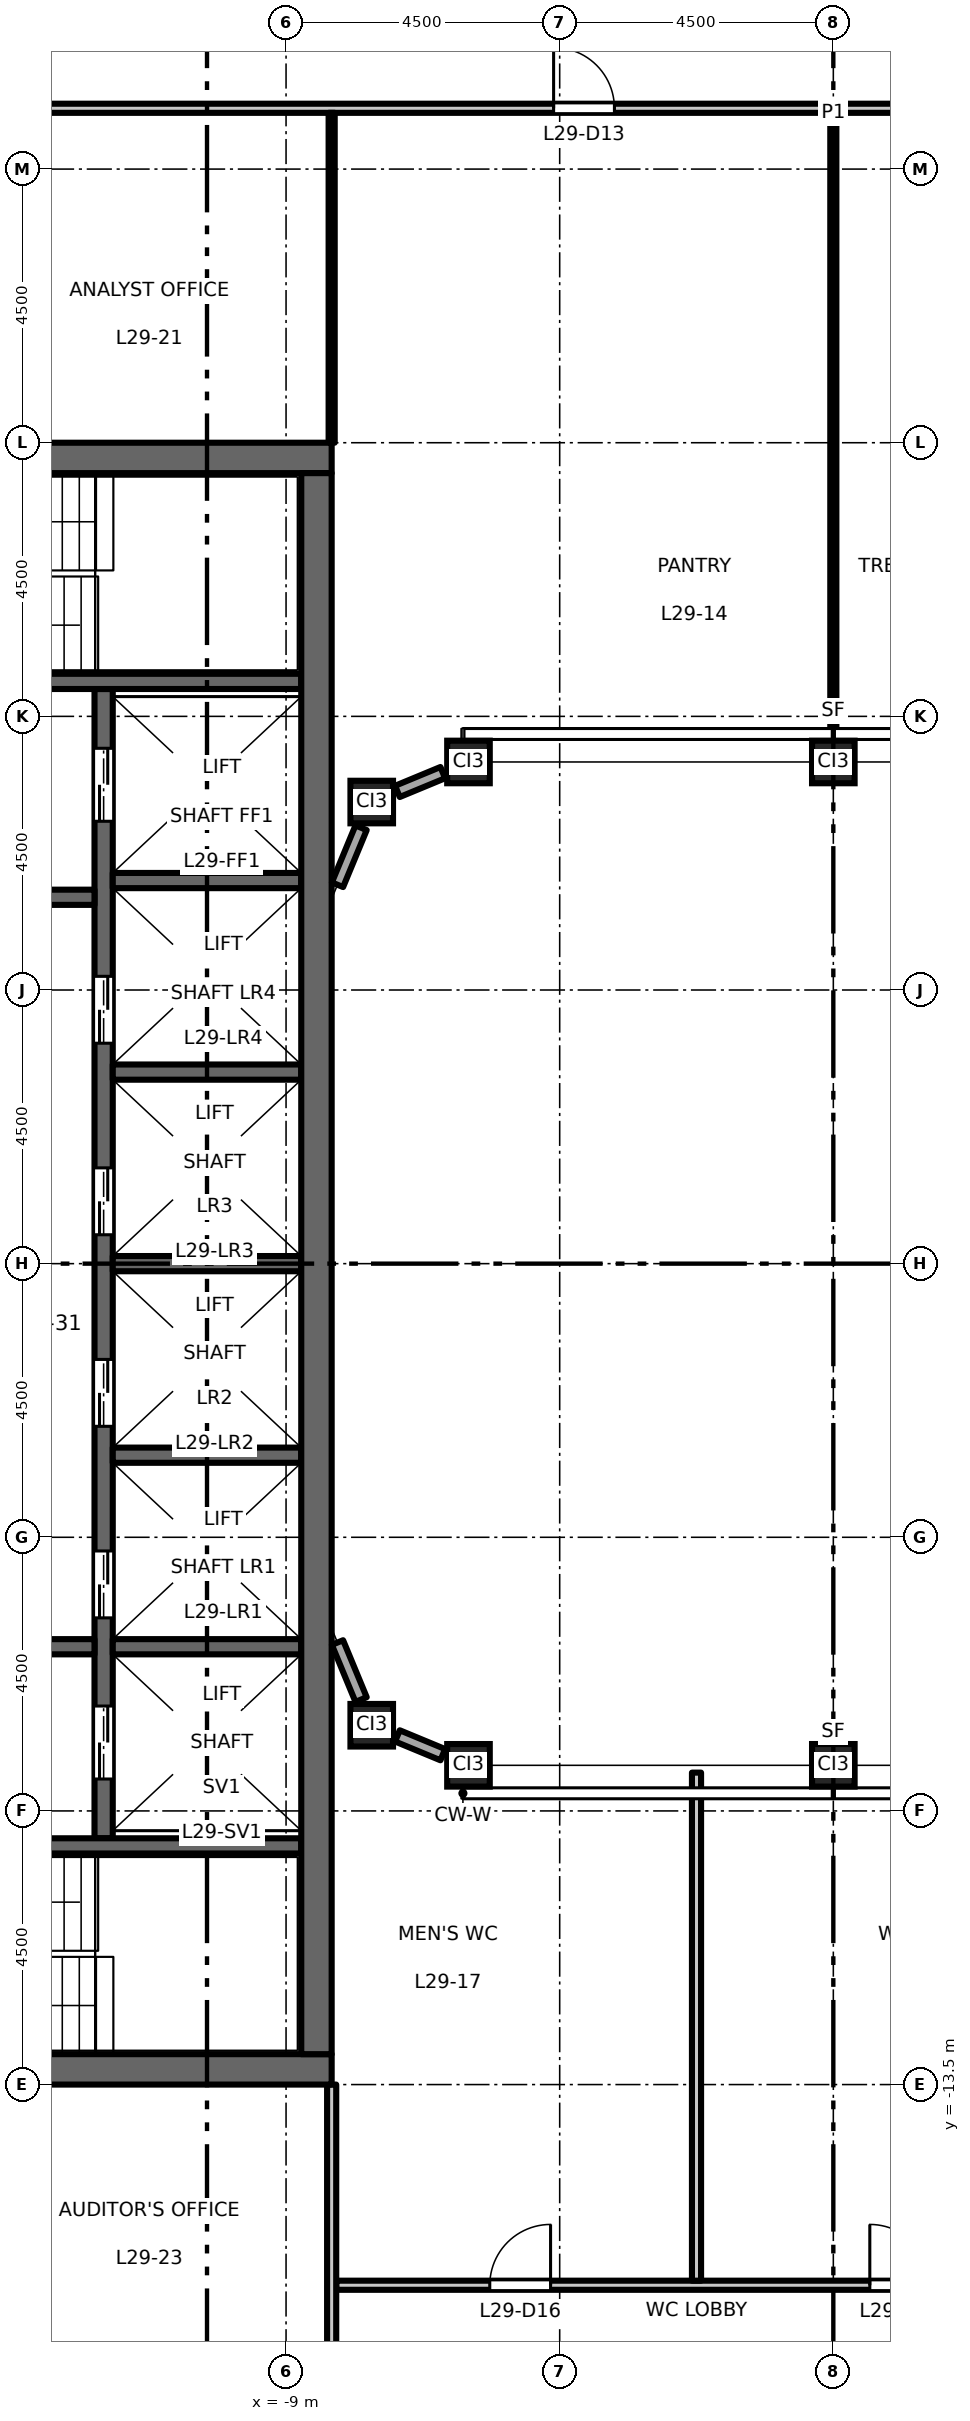
"""IFC4 building model, lengths in metres.
Left out: names, types, materials, properties, quantities, classifications, styles, units other than length and angle.
Written with IfcOpenShell. Run it as: python <this file> out.ifc"""

import sys

from ifc_helpers import new_model, si_unit, direction, frame, frame_2d, origin, origin_2d, place, context, subcontext, project, spatial, rectangle, hollow_rectangle, extrude, element, fill, save


model = new_model("IFC4")
c1 = context("Model", 3, precision=1e-05, world=origin(), true_north=direction((0.0, 1.0)))
c2 = subcontext(c1, "Body", "Model", "MODEL_VIEW")
j1 = project(units=[si_unit("LENGTHUNIT", "METRE"), si_unit("PLANEANGLEUNIT", "RADIAN")], contexts=[c1])
p1 = place(None, origin())
s1 = spatial("IfcSite", under=j1, at=p1, CompositionType="ELEMENT")
p2 = place(p1, origin())
s2 = spatial("IfcBuilding", under=s1, at=p2, CompositionType="ELEMENT")
p3 = place(p2, frame((0.0, 0.0, 136.2)))
s3 = spatial("IfcBuildingStorey", under=s2, at=p3, CompositionType="ELEMENT", Elevation=136.2)
for number, where, z_axis, x_axis in (
    (1, (-7.591, -7.591, 0.0), (0.0, 0.0, 1.0), (1.0, 0.0, 0.0)),
    (2, (-6.0, -8.25, 0.0), (0.0, 0.0, 1.0), (1.0, 0.0, 0.0)),
    (3, (0.0, -8.25, 0.0), (0.0, 0.0, 1.0), (1.0, 0.0, 0.0)),
    (4, (-7.591, 7.591, 0.0), (0.0, 0.0, 1.0), (1.0, 0.0, 0.0)),
    (5, (-6.0, 8.25, 0.0), (0.0, 0.0, 1.0), (1.0, 0.0, 0.0)),
    (6, (0.0, 8.25, 0.0), (0.0, 0.0, 1.0), (1.0, 0.0, 0.0)),
):
    element("IfcColumn", number, at=place(p3, frame(where, z_axis=z_axis, x_axis=x_axis)), inside=s3, PredefinedType="COLUMN", context=c2, shape_type="SweptSolid", body=[
        extrude(hollow_rectangle(XDim=0.7, YDim=0.7, WallThickness=0.04, at=origin_2d()), origin(), (0.0, 0.0, 1.0), 4.5),
    ])
p4 = place(p3, frame((-12.0, -9.45, 0.0), z_axis=(0.0, 0.0, 1.0), x_axis=(0.0, 1.0, 0.0)))
e7 = element("IfcWall", 7, at=p4, inside=s3, PredefinedType="SHEAR", context=c2, shape_type="SweptSolid", body=[
    extrude(rectangle(XDim=18.9, YDim=0.3, at=frame_2d((9.45, 0.0))), origin(), (0.0, 0.0, 1.0), 4.35),
])
p5 = place(p4, frame((3.625, 0.0, 0.0)))
e8 = element("IfcOpeningElement", 8, at=p5, cuts=e7, PredefinedType="OPENING", context=c2, shape_type="SweptSolid", body=[
    extrude(rectangle(XDim=1.1, YDim=2.1, at=frame_2d((0.55, 1.05))), frame((0.0, 0.16, 0.0), z_axis=(0.0, -1.0, 0.0), x_axis=(1.0, 0.0, 0.0)), (0.0, 0.0, 1.0), 0.32),
])
p6 = place(p4, frame((6.775, 0.0, 0.0)))
e9 = element("IfcOpeningElement", 9, at=p6, cuts=e7, PredefinedType="OPENING", context=c2, shape_type="SweptSolid", body=[
    extrude(rectangle(XDim=1.1, YDim=2.1, at=frame_2d((0.55, 1.05))), frame((0.0, 0.16, 0.0), z_axis=(0.0, -1.0, 0.0), x_axis=(1.0, 0.0, 0.0)), (0.0, 0.0, 1.0), 0.32),
])
p7 = place(p4, frame((9.925, 0.0, 0.0)))
e10 = element("IfcOpeningElement", 10, at=p7, cuts=e7, PredefinedType="OPENING", context=c2, shape_type="SweptSolid", body=[
    extrude(rectangle(XDim=1.1, YDim=2.1, at=frame_2d((0.55, 1.05))), frame((0.0, 0.16, 0.0), z_axis=(0.0, -1.0, 0.0), x_axis=(1.0, 0.0, 0.0)), (0.0, 0.0, 1.0), 0.32),
])
p8 = place(p4, frame((13.075, 0.0, 0.0)))
e11 = element("IfcOpeningElement", 11, at=p8, cuts=e7, PredefinedType="OPENING", context=c2, shape_type="SweptSolid", body=[
    extrude(rectangle(XDim=1.1, YDim=2.1, at=frame_2d((0.55, 1.05))), frame((0.0, 0.16, 0.0), z_axis=(0.0, -1.0, 0.0), x_axis=(1.0, 0.0, 0.0)), (0.0, 0.0, 1.0), 0.32),
])
p9 = place(p4, frame((16.725, 0.0, 0.0)))
e12 = element("IfcOpeningElement", 12, at=p9, cuts=e7, PredefinedType="OPENING", context=c2, shape_type="SweptSolid", body=[
    extrude(rectangle(XDim=1.2, YDim=2.1, at=frame_2d((0.6, 1.05))), frame((0.0, 0.16, 0.0), z_axis=(0.0, -1.0, 0.0), x_axis=(1.0, 0.0, 0.0)), (0.0, 0.0, 1.0), 0.32),
])
p10 = place(p4, frame((0.975, 0.0, 0.0)))
e13 = element("IfcOpeningElement", 13, at=p10, cuts=e7, PredefinedType="OPENING", context=c2, shape_type="SweptSolid", body=[
    extrude(rectangle(XDim=1.2, YDim=2.1, at=frame_2d((0.6, 1.05))), frame((0.0, 0.16, 0.0), z_axis=(0.0, -1.0, 0.0), x_axis=(1.0, 0.0, 0.0)), (0.0, 0.0, 1.0), 0.32),
])
p11 = place(p3, frame((-12.15, 6.025, 0.0), z_axis=(0.0, 0.0, 1.0), x_axis=(-1.0, 0.0, 0.0)))
e14 = element("IfcWall", 14, at=p11, inside=s3, PredefinedType="SHEAR", context=c2, shape_type="SweptSolid", body=[
    extrude(rectangle(XDim=4.6, YDim=0.25, at=frame_2d((2.3, 0.0))), origin(), (0.0, 0.0, 1.0), 4.35),
])
p12 = place(p11, frame((1.8, 0.0, 0.0)))
e15 = element("IfcOpeningElement", 15, at=p12, cuts=e14, PredefinedType="OPENING", context=c2, shape_type="SweptSolid", body=[
    extrude(rectangle(XDim=1.0, YDim=2.1, at=frame_2d((0.5, 1.05))), frame((0.0, 0.135, 0.0), z_axis=(0.0, -1.0, 0.0), x_axis=(1.0, 0.0, 0.0)), (0.0, 0.0, 1.0), 0.27),
])
p13 = place(p3, frame((-12.15, -6.3, 0.0), z_axis=(0.0, 0.0, 1.0), x_axis=(-1.0, 0.0, 0.0)))
e16 = element("IfcWall", 16, at=p13, inside=s3, PredefinedType="SHEAR", context=c2, shape_type="SweptSolid", body=[
    extrude(rectangle(XDim=9.1, YDim=0.25, at=frame_2d((4.55, 0.0))), origin(), (0.0, 0.0, 1.0), 4.35),
])
p14 = place(p13, frame((1.8, 0.0, 0.0)))
e17 = element("IfcOpeningElement", 17, at=p14, cuts=e16, PredefinedType="OPENING", context=c2, shape_type="SweptSolid", body=[
    extrude(rectangle(XDim=1.0, YDim=2.1, at=frame_2d((0.5, 1.05))), frame((0.0, 0.135, 0.0), z_axis=(0.0, -1.0, 0.0), x_axis=(1.0, 0.0, 0.0)), (0.0, 0.0, 1.0), 0.27),
])
p15 = place(p13, frame((6.65, 0.0, 0.0)))
e18 = element("IfcOpeningElement", 18, at=p15, cuts=e16, PredefinedType="OPENING", context=c2, shape_type="SweptSolid", body=[
    extrude(rectangle(XDim=0.9, YDim=2.1, at=frame_2d((0.45, 1.05))), frame((0.0, 0.135, 0.0), z_axis=(0.0, -1.0, 0.0), x_axis=(1.0, 0.0, 0.0)), (0.0, 0.0, 1.0), 0.27),
])
for number, where, z_axis, x_axis in (
    (19, (-8.75, 0.0, 0.0), (0.0, 0.0, 1.0), (-1.0, 0.0, 0.0)),
    (20, (-8.75, 3.15, 0.0), (0.0, 0.0, 1.0), (-1.0, 0.0, 0.0)),
    (21, (-8.75, 6.3, 0.0), (0.0, 0.0, 1.0), (-1.0, 0.0, 0.0)),
    (22, (-8.75, -3.15, 0.0), (0.0, 0.0, 1.0), (-1.0, 0.0, 0.0)),
    (23, (-8.75, -6.3, 0.0), (0.0, 0.0, 1.0), (-1.0, 0.0, 0.0)),
):
    element("IfcWall", number, at=place(p3, frame(where, z_axis=z_axis, x_axis=x_axis)), inside=s3, PredefinedType="SHEAR", context=c2, shape_type="SweptSolid", body=[
        extrude(rectangle(XDim=3.1, YDim=0.25, at=frame_2d((1.55, 0.0))), origin(), (0.0, 0.0, 1.0), 4.35),
    ])
p16 = place(p3, frame((-8.75, 9.575, 0.0), z_axis=(0.0, 0.0, 1.0), x_axis=(-1.0, 0.0, 0.0)))
e24 = element("IfcWall", 24, at=p16, inside=s3, PredefinedType="SHEAR", context=c2, shape_type="SweptSolid", body=[
    extrude(rectangle(XDim=8.0, YDim=0.25, at=frame_2d((4.0, 0.0))), origin(), (0.0, 0.0, 1.0), 4.35),
])
p17 = place(p16, frame((6.65, 0.0, 0.0)))
e25 = element("IfcOpeningElement", 25, at=p17, cuts=e24, PredefinedType="OPENING", context=c2, shape_type="SweptSolid", body=[
    extrude(rectangle(XDim=1.1, YDim=2.1, at=frame_2d((0.55, 1.05))), frame((0.0, 0.135, 0.0), z_axis=(0.0, -1.0, 0.0), x_axis=(1.0, 0.0, 0.0)), (0.0, 0.0, 1.0), 0.27),
])
p18 = place(p3, frame((-8.75, -9.575, 0.0), z_axis=(0.0, 0.0, 1.0), x_axis=(-1.0, 0.0, 0.0)))
e26 = element("IfcWall", 26, at=p18, inside=s3, PredefinedType="SHEAR", context=c2, shape_type="SweptSolid", body=[
    extrude(rectangle(XDim=8.0, YDim=0.25, at=frame_2d((4.0, 0.0))), origin(), (0.0, 0.0, 1.0), 4.35),
])
p19 = place(p18, frame((6.65, 0.0, 0.0)))
e27 = element("IfcOpeningElement", 27, at=p19, cuts=e26, PredefinedType="OPENING", context=c2, shape_type="SweptSolid", body=[
    extrude(rectangle(XDim=1.1, YDim=2.1, at=frame_2d((0.55, 1.05))), frame((0.0, 0.135, 0.0), z_axis=(0.0, -1.0, 0.0), x_axis=(1.0, 0.0, 0.0)), (0.0, 0.0, 1.0), 0.27),
])
for number, where, z_axis, x_axis in (
    (28, (-8.25, 13.25, 0.0), (0.0, 0.0, 1.0), (-1.0, 0.0, 0.0)),
    (29, (-8.25, -13.25, 0.0), (0.0, 0.0, 1.0), (-1.0, 0.0, 0.0)),
):
    element("IfcWall", number, at=place(p3, frame(where, z_axis=z_axis, x_axis=x_axis)), inside=s3, PredefinedType="SHEAR", context=c2, shape_type="SweptSolid", body=[
        extrude(rectangle(XDim=13.5, YDim=0.5, at=frame_2d((6.75, 0.0))), origin(), (0.0, 0.0, 1.0), 4.35),
    ])
p20 = place(p3, frame((-8.5, -13.0, 0.0), z_axis=(0.0, 0.0, 1.0), x_axis=(0.0, 1.0, 0.0)))
e30 = element("IfcWall", 30, at=p20, inside=s3, PredefinedType="SHEAR", context=c2, shape_type="SweptSolid", body=[
    extrude(rectangle(XDim=26.0, YDim=0.5, at=frame_2d((13.0, 0.0))), origin(), (0.0, 0.0, 1.0), 4.35),
])
p21 = place(p3, frame((-6.423, 8.075, 0.0), z_axis=(0.0, 0.0, 1.0), x_axis=(-0.923817771127, -0.382832503518, 0.0)))
e31 = element("IfcWall", 31, at=p21, inside=s3, PredefinedType="STANDARD", context=c2, shape_type="SweptSolid", body=[
    extrude(rectangle(XDim=0.807, YDim=0.2, at=frame_2d((0.404, 0.0))), origin(), (0.0, 0.0, 1.0), 3.826),
])
for number, where, z_axis, x_axis in (
    (32, (-7.766, 7.168, 0.0), (0.0, 0.0, 1.0), (-0.383, -0.924, 0.0)),
    (33, (-8.154, -6.231, 0.0), (0.0, 0.0, 1.0), (0.383, -0.924, 0.0)),
):
    element("IfcWall", number, at=place(p3, frame(where, z_axis=z_axis, x_axis=x_axis)), inside=s3, PredefinedType="STANDARD", context=c2, shape_type="SweptSolid", body=[
        extrude(rectangle(XDim=1.015, YDim=0.2, at=frame_2d((0.507, 0.0))), origin(), (0.0, 0.0, 1.0), 3.826),
    ])
p22 = place(p3, frame((-7.168, -7.766, 0.0), z_axis=(0.0, 0.0, 1.0), x_axis=(0.923817771127, -0.382832503518, 0.0)))
e34 = element("IfcWall", 34, at=p22, inside=s3, PredefinedType="STANDARD", context=c2, shape_type="SweptSolid", body=[
    extrude(rectangle(XDim=0.807, YDim=0.2, at=frame_2d((0.404, 0.0))), origin(), (0.0, 0.0, 1.0), 3.826),
])
p23 = place(p3, frame((-8.175, -16.8, 0.0), z_axis=(0.0, 0.0, 1.0), x_axis=(1.0, 0.0, 0.0)))
e35 = element("IfcWall", 35, at=p23, inside=s3, PredefinedType="PARTITIONING", context=c2, shape_type="SweptSolid", body=[
    extrude(rectangle(XDim=14.835, YDim=0.15, at=frame_2d((7.417, 0.0))), origin(), (0.0, 0.0, 1.0), 4.35),
])
p24 = place(p23, frame((2.525, 0.0, 0.0)))
e36 = element("IfcOpeningElement", 36, at=p24, cuts=e35, PredefinedType="OPENING", context=c2, shape_type="SweptSolid", body=[
    extrude(rectangle(XDim=1.0, YDim=2.1, at=frame_2d((0.5, 1.05))), frame((0.0, 0.085, 0.0), z_axis=(0.0, -1.0, 0.0), x_axis=(1.0, 0.0, 0.0)), (0.0, 0.0, 1.0), 0.17),
])
p25 = place(p23, frame((8.775, 0.0, 0.0)))
e37 = element("IfcOpeningElement", 37, at=p25, cuts=e35, PredefinedType="OPENING", context=c2, shape_type="SweptSolid", body=[
    extrude(rectangle(XDim=1.0, YDim=2.1, at=frame_2d((0.5, 1.05))), frame((0.0, 0.085, 0.0), z_axis=(0.0, -1.0, 0.0), x_axis=(1.0, 0.0, 0.0)), (0.0, 0.0, 1.0), 0.17),
])
p26 = place(p23, frame((12.935, 0.0, 0.0)))
e38 = element("IfcOpeningElement", 38, at=p26, cuts=e35, PredefinedType="OPENING", context=c2, shape_type="SweptSolid", body=[
    extrude(rectangle(XDim=1.0, YDim=2.1, at=frame_2d((0.5, 1.05))), frame((0.0, 0.085, 0.0), z_axis=(0.0, -1.0, 0.0), x_axis=(1.0, 0.0, 0.0)), (0.0, 0.0, 1.0), 0.17),
])
p27 = place(p3, frame((-21.825, 19.0, 0.0), z_axis=(0.0, 0.0, 1.0), x_axis=(1.0, 0.0, 0.0)))
e39 = element("IfcWall", 39, at=p27, inside=s3, PredefinedType="PARTITIONING", context=c2, shape_type="SweptSolid", body=[
    extrude(rectangle(XDim=43.65, YDim=0.15, at=frame_2d((21.825, 0.0))), origin(), (0.0, 0.0, 1.0), 4.35),
])
p28 = place(p27, frame((17.225, 0.0, 0.0)))
e40 = element("IfcOpeningElement", 40, at=p28, cuts=e39, PredefinedType="OPENING", context=c2, shape_type="SweptSolid", body=[
    extrude(rectangle(XDim=1.0, YDim=2.1, at=frame_2d((0.5, 1.05))), frame((0.0, 0.085, 0.0), z_axis=(0.0, -1.0, 0.0), x_axis=(1.0, 0.0, 0.0)), (0.0, 0.0, 1.0), 0.17),
])
p29 = place(p27, frame((25.475, 0.0, 0.0)))
e41 = element("IfcOpeningElement", 41, at=p29, cuts=e39, PredefinedType="OPENING", context=c2, shape_type="SweptSolid", body=[
    extrude(rectangle(XDim=1.0, YDim=2.1, at=frame_2d((0.5, 1.05))), frame((0.0, 0.085, 0.0), z_axis=(0.0, -1.0, 0.0), x_axis=(1.0, 0.0, 0.0)), (0.0, 0.0, 1.0), 0.17),
])
p30 = place(p27, frame((6.225, 0.0, 0.0)))
e42 = element("IfcOpeningElement", 42, at=p30, cuts=e39, PredefinedType="OPENING", context=c2, shape_type="SweptSolid", body=[
    extrude(rectangle(XDim=1.0, YDim=2.1, at=frame_2d((0.5, 1.05))), frame((0.0, 0.085, 0.0), z_axis=(0.0, -1.0, 0.0), x_axis=(1.0, 0.0, 0.0)), (0.0, 0.0, 1.0), 0.17),
])
p31 = place(p27, frame((36.225, 0.0, 0.0)))
e43 = element("IfcOpeningElement", 43, at=p31, cuts=e39, PredefinedType="OPENING", context=c2, shape_type="SweptSolid", body=[
    extrude(rectangle(XDim=1.0, YDim=2.1, at=frame_2d((0.5, 1.05))), frame((0.0, 0.085, 0.0), z_axis=(0.0, -1.0, 0.0), x_axis=(1.0, 0.0, 0.0)), (0.0, 0.0, 1.0), 0.17),
])
p32 = place(p3, frame((-8.25, 13.5, 0.0), z_axis=(0.0, 0.0, 1.0), x_axis=(0.0, 1.0, 0.0)))
e44 = element("IfcWall", 44, at=p32, inside=s3, PredefinedType="PARTITIONING", context=c2, shape_type="SweptSolid", body=[
    extrude(rectangle(XDim=5.425, YDim=0.1, at=frame_2d((2.712, 0.0))), origin(), (0.0, 0.0, 1.0), 4.35),
])
p33 = place(p3, frame((-8.25, -18.925, 0.0), z_axis=(0.0, 0.0, 1.0), x_axis=(0.0, 1.0, 0.0)))
e45 = element("IfcWall", 45, at=p33, inside=s3, PredefinedType="PARTITIONING", context=c2, shape_type="SweptSolid", body=[
    extrude(rectangle(XDim=5.425, YDim=0.15, at=frame_2d((2.712, 0.0))), origin(), (0.0, 0.0, 1.0), 4.35),
])
p34 = place(p3, frame((-2.25, -16.725, 0.0), z_axis=(0.0, 0.0, 1.0), x_axis=(0.0, 1.0, 0.0)))
e46 = element("IfcWall", 46, at=p34, inside=s3, PredefinedType="PARTITIONING", context=c2, shape_type="SweptSolid", body=[
    extrude(rectangle(XDim=8.355, YDim=0.15, at=frame_2d((4.177, 0.0))), origin(), (0.0, 0.0, 1.0), 4.35),
])
p35 = place(p3, frame((0.0, 8.65, 0.0), z_axis=(0.0, 0.0, 1.0), x_axis=(0.0, 1.0, 0.0)))
e47 = element("IfcWall", 47, at=p35, inside=s3, PredefinedType="PARTITIONING", context=c2, shape_type="SweptSolid", body=[
    extrude(rectangle(XDim=10.275, YDim=0.1, at=frame_2d((5.138, 0.0))), origin(), (0.0, 0.0, 1.0), 3.45),
])
p36 = place(p5, origin())
e48 = element("IfcDoor", 48, at=p36, inside=s3, OperationType="DOUBLE_DOOR_SLIDING", PredefinedType="DOOR", context=c2, shape_type="SweptSolid", body=[
    extrude(rectangle(XDim=1.1, YDim=2.1, at=frame_2d((0.55, 1.05))), frame((0.0, 0.025, 0.0), z_axis=(0.0, -1.0, 0.0), x_axis=(1.0, 0.0, 0.0)), (0.0, 0.0, 1.0), 0.05),
])
fill(e8, e48)
p37 = place(p6, origin())
e49 = element("IfcDoor", 49, at=p37, inside=s3, OperationType="DOUBLE_DOOR_SLIDING", PredefinedType="DOOR", context=c2, shape_type="SweptSolid", body=[
    extrude(rectangle(XDim=1.1, YDim=2.1, at=frame_2d((0.55, 1.05))), frame((0.0, 0.025, 0.0), z_axis=(0.0, -1.0, 0.0), x_axis=(1.0, 0.0, 0.0)), (0.0, 0.0, 1.0), 0.05),
])
fill(e9, e49)
p38 = place(p7, origin())
e50 = element("IfcDoor", 50, at=p38, inside=s3, OperationType="DOUBLE_DOOR_SLIDING", PredefinedType="DOOR", context=c2, shape_type="SweptSolid", body=[
    extrude(rectangle(XDim=1.1, YDim=2.1, at=frame_2d((0.55, 1.05))), frame((0.0, 0.025, 0.0), z_axis=(0.0, -1.0, 0.0), x_axis=(1.0, 0.0, 0.0)), (0.0, 0.0, 1.0), 0.05),
])
fill(e10, e50)
p39 = place(p8, origin())
e51 = element("IfcDoor", 51, at=p39, inside=s3, OperationType="DOUBLE_DOOR_SLIDING", PredefinedType="DOOR", context=c2, shape_type="SweptSolid", body=[
    extrude(rectangle(XDim=1.1, YDim=2.1, at=frame_2d((0.55, 1.05))), frame((0.0, 0.025, 0.0), z_axis=(0.0, -1.0, 0.0), x_axis=(1.0, 0.0, 0.0)), (0.0, 0.0, 1.0), 0.05),
])
fill(e11, e51)
p40 = place(p9, origin())
e52 = element("IfcDoor", 52, at=p40, inside=s3, OperationType="DOUBLE_DOOR_SLIDING", PredefinedType="DOOR", context=c2, shape_type="SweptSolid", body=[
    extrude(rectangle(XDim=1.2, YDim=2.1, at=frame_2d((0.6, 1.05))), frame((0.0, 0.025, 0.0), z_axis=(0.0, -1.0, 0.0), x_axis=(1.0, 0.0, 0.0)), (0.0, 0.0, 1.0), 0.05),
])
fill(e12, e52)
p41 = place(p10, origin())
e53 = element("IfcDoor", 53, at=p41, inside=s3, OperationType="DOUBLE_DOOR_SLIDING", PredefinedType="DOOR", context=c2, shape_type="SweptSolid", body=[
    extrude(rectangle(XDim=1.2, YDim=2.1, at=frame_2d((0.6, 1.05))), frame((0.0, 0.025, 0.0), z_axis=(0.0, -1.0, 0.0), x_axis=(1.0, 0.0, 0.0)), (0.0, 0.0, 1.0), 0.05),
])
fill(e13, e53)
p42 = place(p28, origin())
e54 = element("IfcDoor", 54, at=p42, inside=s3, OperationType="SINGLE_SWING_LEFT", PredefinedType="DOOR", context=c2, shape_type="SweptSolid", body=[
    extrude(rectangle(XDim=1.0, YDim=2.1, at=frame_2d((0.5, 1.05))), frame((0.0, 0.025, 0.0), z_axis=(0.0, -1.0, 0.0), x_axis=(1.0, 0.0, 0.0)), (0.0, 0.0, 1.0), 0.05),
])
fill(e40, e54)
p43 = place(p24, origin())
e55 = element("IfcDoor", 55, at=p43, inside=s3, OperationType="SINGLE_SWING_RIGHT", PredefinedType="DOOR", context=c2, shape_type="SweptSolid", body=[
    extrude(rectangle(XDim=1.0, YDim=2.1, at=frame_2d((0.5, 1.05))), frame((0.0, 0.025, 0.0), z_axis=(0.0, -1.0, 0.0), x_axis=(1.0, 0.0, 0.0)), (0.0, 0.0, 1.0), 0.05),
])
fill(e36, e55)
p44 = place(p25, origin())
e56 = element("IfcDoor", 56, at=p44, inside=s3, OperationType="SINGLE_SWING_LEFT", PredefinedType="DOOR", context=c2, shape_type="SweptSolid", body=[
    extrude(rectangle(XDim=1.0, YDim=2.1, at=frame_2d((0.5, 1.05))), frame((0.0, 0.025, 0.0), z_axis=(0.0, -1.0, 0.0), x_axis=(1.0, 0.0, 0.0)), (0.0, 0.0, 1.0), 0.05),
])
fill(e37, e56)
save(model, sys.argv[1])
